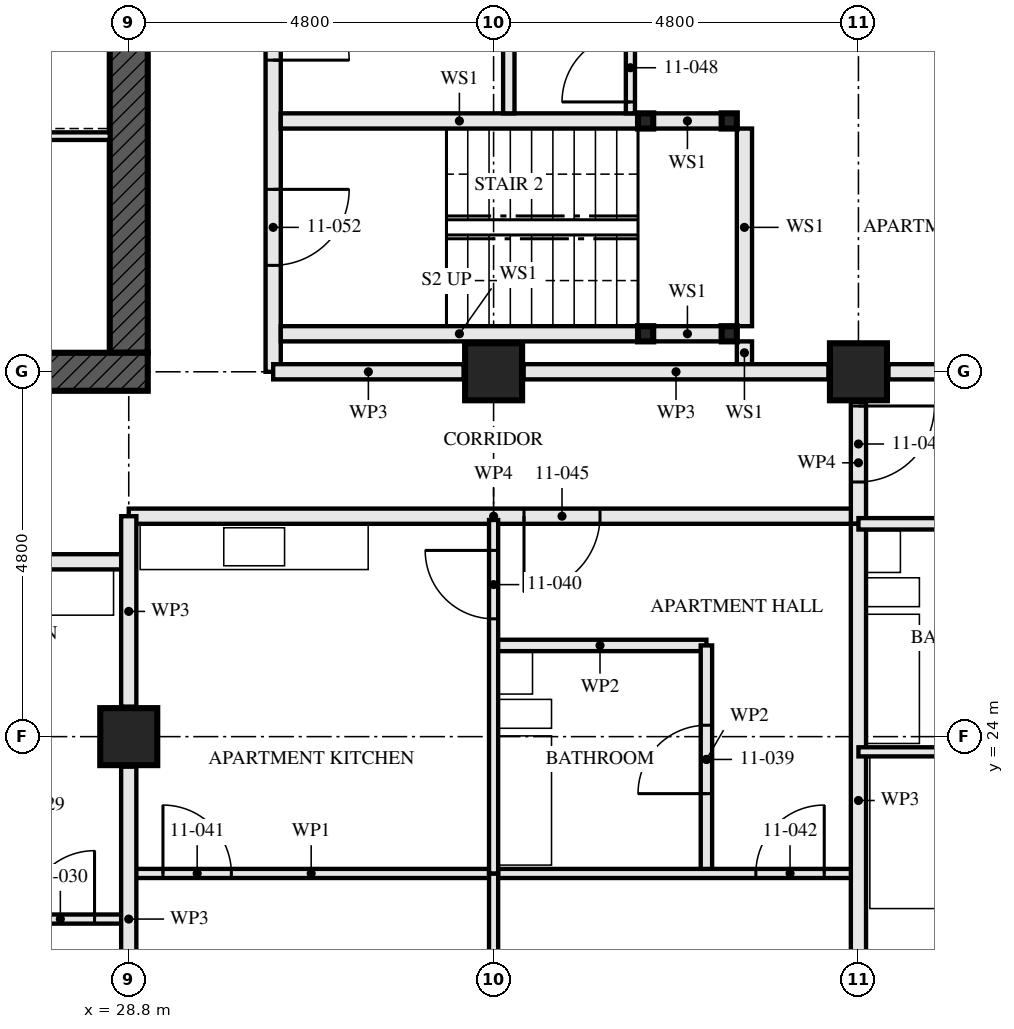
"""IFC4 building model, lengths in metres.
Left out: names, types, materials, properties, quantities, classifications, styles, units other than length and angle.
Written with IfcOpenShell. Run it as: python <this file> out.ifc"""

import sys

from ifc_helpers import new_model, si_unit, direction, frame, frame_2d, origin, origin_2d, place, context, subcontext, project, spatial, rectangle, hollow_rectangle, extrude, element, fill, save


model = new_model("IFC4")
c1 = context("Model", 3, precision=1e-05, world=origin(), true_north=direction((0.0, 1.0)))
c2 = subcontext(c1, "Body", "Model", "MODEL_VIEW")
j1 = project(units=[si_unit("LENGTHUNIT", "METRE"), si_unit("PLANEANGLEUNIT", "RADIAN")], contexts=[c1])
p1 = place(None, origin())
s1 = spatial("IfcSite", under=j1, at=p1, CompositionType="ELEMENT")
p2 = place(p1, origin())
s2 = spatial("IfcBuilding", under=s1, at=p2, CompositionType="ELEMENT")
p3 = place(p2, frame((0.0, 0.0, 44.5)))
s3 = spatial("IfcBuildingStorey", under=s2, at=p3, CompositionType="ELEMENT", Elevation=44.5)
for number, where, z_axis, x_axis in (
    (1, (28.8, 24.0, 0.0), (0.0, 0.0, 1.0), (1.0, 0.0, 0.0)),
    (2, (33.6, 28.8, 0.0), (0.0, 0.0, 1.0), (0.0, 1.0, 0.0)),
    (3, (38.4, 28.8, 0.0), (0.0, 0.0, 1.0), (0.0, 1.0, 0.0)),
):
    element("IfcColumn", number, at=place(p3, frame(where, z_axis=z_axis, x_axis=x_axis)), inside=s3, PredefinedType="COLUMN", context=c2, shape_type="SweptSolid", body=[
        extrude(hollow_rectangle(XDim=0.75, YDim=0.75, WallThickness=0.08, at=origin_2d()), origin(), (0.0, 0.0, 1.0), 3.5),
    ])
p4 = place(p3, frame((14.15, 28.8, -0.17), z_axis=(0.0, 0.0, 1.0), x_axis=(1.0, 0.0, 0.0)))
e4 = element("IfcWall", 4, at=p4, inside=s3, PredefinedType="SHEAR", context=c2, shape_type="SweptSolid", body=[
    extrude(rectangle(XDim=14.9, YDim=0.5, at=frame_2d((7.45, 0.0))), origin(), (0.0, 0.0, 1.0), 3.5),
])
p5 = place(p4, frame((6.85, 0.0, 0.17)))
e5 = element("IfcOpeningElement", 5, at=p5, cuts=e4, PredefinedType="OPENING", context=c2, shape_type="SweptSolid", body=[
    extrude(rectangle(XDim=1.2, YDim=2.1, at=frame_2d((0.6, 1.05))), frame((0.0, 0.26, 0.0), z_axis=(0.0, -1.0, 0.0), x_axis=(1.0, 0.0, 0.0)), (0.0, 0.0, 1.0), 0.521),
])
p6 = place(p3, frame((28.8, 29.05, -0.17), z_axis=(0.0, 0.0, 1.0), x_axis=(0.0, 1.0, 0.0)))
e6 = element("IfcWall", 6, at=p6, inside=s3, PredefinedType="SHEAR", context=c2, shape_type="SweptSolid", body=[
    extrude(rectangle(XDim=13.9, YDim=0.5, at=frame_2d((6.95, 0.0))), origin(), (0.0, 0.0, 1.0), 3.5),
])
p7 = place(p6, frame((6.35, 0.0, 0.17)))
e7 = element("IfcOpeningElement", 7, at=p7, cuts=e6, PredefinedType="OPENING", context=c2, shape_type="SweptSolid", body=[
    extrude(rectangle(XDim=1.2, YDim=2.1, at=frame_2d((0.6, 1.05))), frame((0.0, 0.26, 0.0), z_axis=(0.0, -1.0, 0.0), x_axis=(1.0, 0.0, 0.0)), (0.0, 0.0, 1.0), 0.521),
])
for number, where, z_axis, x_axis in (
    (8, (36.7, 29.3, 0.0), (0.0, 0.0, 1.0), (1.0, 0.0, 0.0)),
    (9, (36.7, 32.1, 0.0), (0.0, 0.0, 1.0), (1.0, 0.0, 0.0)),
    (10, (35.6, 29.3, 0.0), (0.0, 0.0, 1.0), (1.0, 0.0, 0.0)),
    (11, (35.6, 32.1, 0.0), (0.0, 0.0, 1.0), (1.0, 0.0, 0.0)),
):
    element("IfcColumn", number, at=place(p3, frame(where, z_axis=z_axis, x_axis=x_axis)), inside=s3, PredefinedType="COLUMN", context=c2, shape_type="SweptSolid", body=[
        extrude(hollow_rectangle(XDim=0.2, YDim=0.2, WallThickness=0.008, at=origin_2d()), origin(), (0.0, 0.0, 1.0), 3.33),
    ])
p8 = place(p3, frame((24.0, 21.6, 0.0), z_axis=(0.0, 0.0, 1.0), x_axis=(1.0, 0.0, 0.0)))
e12 = element("IfcWall", 12, at=p8, inside=s3, PredefinedType="PARTITIONING", context=c2, shape_type="SweptSolid", body=[
    extrude(rectangle(XDim=4.8, YDim=0.12, at=frame_2d((2.4, 0.0))), origin(), (0.0, 0.0, 1.0), 3.33),
])
p9 = place(p8, frame((3.45, 0.0, 0.0)))
e13 = element("IfcOpeningElement", 13, at=p9, cuts=e12, PredefinedType="OPENING", context=c2, shape_type="SweptSolid", body=[
    extrude(rectangle(XDim=0.9, YDim=2.1, at=frame_2d((0.45, 1.05))), frame((0.0, 0.071, 0.0), z_axis=(0.0, -1.0, 0.0), x_axis=(1.0, 0.0, 0.0)), (0.0, 0.0, 1.0), 0.141),
])
p10 = place(p3, frame((17.8, 26.3, 0.0), z_axis=(0.0, 0.0, 1.0), x_axis=(1.0, 0.0, 0.0)))
e14 = element("IfcWall", 14, at=p10, inside=s3, PredefinedType="PARTITIONING", context=c2, shape_type="SweptSolid", body=[
    extrude(rectangle(XDim=11.0, YDim=0.2, at=frame_2d((5.5, 0.0))), origin(), (0.0, 0.0, 1.0), 2.55),
])
p11 = place(p10, frame((1.8, 0.0, 0.0)))
e15 = element("IfcOpeningElement", 15, at=p11, cuts=e14, PredefinedType="OPENING", context=c2, shape_type="SweptSolid", body=[
    extrude(rectangle(XDim=1.0, YDim=2.1, at=frame_2d((0.5, 1.05))), frame((0.0, 0.111, 0.0), z_axis=(0.0, -1.0, 0.0), x_axis=(1.0, 0.0, 0.0)), (0.0, 0.0, 1.0), 0.221),
])
p12 = place(p10, frame((6.6, 0.0, 0.0)))
e16 = element("IfcOpeningElement", 16, at=p12, cuts=e14, PredefinedType="OPENING", context=c2, shape_type="SweptSolid", body=[
    extrude(rectangle(XDim=1.0, YDim=2.1, at=frame_2d((0.5, 1.05))), frame((0.0, 0.111, 0.0), z_axis=(0.0, -1.0, 0.0), x_axis=(1.0, 0.0, 0.0)), (0.0, 0.0, 1.0), 0.221),
])
p13 = place(p3, frame((36.4, 22.2, 0.0), z_axis=(0.0, 0.0, 1.0), x_axis=(0.0, 1.0, 0.0)))
e17 = element("IfcWall", 17, at=p13, inside=s3, PredefinedType="PARTITIONING", context=c2, shape_type="SweptSolid", body=[
    extrude(rectangle(XDim=3.0, YDim=0.15, at=frame_2d((1.5, 0.0))), origin(), (0.0, 0.0, 1.0), 2.55),
])
p14 = place(p13, frame((1.05, 0.0, 0.0)))
e18 = element("IfcOpeningElement", 18, at=p14, cuts=e17, PredefinedType="OPENING", context=c2, shape_type="SweptSolid", body=[
    extrude(rectangle(XDim=0.9, YDim=2.1, at=frame_2d((0.45, 1.05))), frame((0.0, 0.085, 0.0), z_axis=(0.0, -1.0, 0.0), x_axis=(1.0, 0.0, 0.0)), (0.0, 0.0, 1.0), 0.171),
])
p15 = place(p3, frame((33.6, 25.2, 0.0), z_axis=(0.0, 0.0, 1.0), x_axis=(1.0, 0.0, 0.0)))
e19 = element("IfcWall", 19, at=p15, inside=s3, PredefinedType="PARTITIONING", context=c2, shape_type="SweptSolid", body=[
    extrude(rectangle(XDim=2.8, YDim=0.15, at=frame_2d((1.4, 0.0))), origin(), (0.0, 0.0, 1.0), 3.33),
])
p16 = place(p3, frame((33.6, 22.2, 0.0), z_axis=(0.0, 0.0, 1.0), x_axis=(0.0, 1.0, 0.0)))
e20 = element("IfcWall", 20, at=p16, inside=s3, PredefinedType="PARTITIONING", context=c2, shape_type="SweptSolid", body=[
    extrude(rectangle(XDim=4.65, YDim=0.12, at=frame_2d((2.325, 0.0))), origin(), (0.0, 0.0, 1.0), 2.55),
])
p17 = place(p16, frame((3.35, 0.0, 0.0)))
e21 = element("IfcOpeningElement", 21, at=p17, cuts=e20, PredefinedType="OPENING", context=c2, shape_type="SweptSolid", body=[
    extrude(rectangle(XDim=0.9, YDim=2.1, at=frame_2d((0.45, 1.05))), frame((0.0, 0.071, 0.0), z_axis=(0.0, -1.0, 0.0), x_axis=(1.0, 0.0, 0.0)), (0.0, 0.0, 1.0), 0.141),
])
p18 = place(p3, frame((28.8, 22.2, 0.0), z_axis=(0.0, 0.0, 1.0), x_axis=(1.0, 0.0, 0.0)))
e22 = element("IfcWall", 22, at=p18, inside=s3, PredefinedType="PARTITIONING", context=c2, shape_type="SweptSolid", body=[
    extrude(rectangle(XDim=4.8, YDim=0.12, at=frame_2d((2.4, 0.0))), origin(), (0.0, 0.0, 1.0), 3.33),
])
p19 = place(p18, frame((0.45, 0.0, 0.0)))
e23 = element("IfcOpeningElement", 23, at=p19, cuts=e22, PredefinedType="OPENING", context=c2, shape_type="SweptSolid", body=[
    extrude(rectangle(XDim=0.9, YDim=2.1, at=frame_2d((0.45, 1.05))), frame((0.0, 0.071, 0.0), z_axis=(0.0, -1.0, 0.0), x_axis=(1.0, 0.0, 0.0)), (0.0, 0.0, 1.0), 0.141),
])
p20 = place(p3, frame((33.6, 22.2, 0.0), z_axis=(0.0, 0.0, 1.0), x_axis=(1.0, 0.0, 0.0)))
e24 = element("IfcWall", 24, at=p20, inside=s3, PredefinedType="PARTITIONING", context=c2, shape_type="SweptSolid", body=[
    extrude(rectangle(XDim=4.8, YDim=0.12, at=frame_2d((2.4, 0.0))), origin(), (0.0, 0.0, 1.0), 3.33),
])
p21 = place(p20, frame((3.45, 0.0, 0.0)))
e25 = element("IfcOpeningElement", 25, at=p21, cuts=e24, PredefinedType="OPENING", context=c2, shape_type="SweptSolid", body=[
    extrude(rectangle(XDim=0.9, YDim=2.1, at=frame_2d((0.45, 1.05))), frame((0.0, 0.071, 0.0), z_axis=(0.0, -1.0, 0.0), x_axis=(1.0, 0.0, 0.0)), (0.0, 0.0, 1.0), 0.141),
])
p22 = place(p3, frame((33.6, 14.72, 0.0), z_axis=(0.0, 0.0, 1.0), x_axis=(0.0, 1.0, 0.0)))
e26 = element("IfcWall", 26, at=p22, inside=s3, PredefinedType="PARTITIONING", context=c2, shape_type="SweptSolid", body=[
    extrude(rectangle(XDim=7.48, YDim=0.12, at=frame_2d((3.74, 0.0))), origin(), (0.0, 0.0, 1.0), 2.55),
])
p23 = place(p3, frame((38.4, 19.52, 0.0), z_axis=(0.0, 0.0, 1.0), x_axis=(0.0, 1.0, 0.0)))
e27 = element("IfcWall", 27, at=p23, inside=s3, PredefinedType="PARTITIONING", context=c2, shape_type="SweptSolid", body=[
    extrude(rectangle(XDim=7.28, YDim=0.2, at=frame_2d((3.64, 0.0))), origin(), (0.0, 0.0, 1.0), 2.55),
])
p24 = place(p3, frame((38.4, 26.8, 0.0), z_axis=(0.0, 0.0, 1.0), x_axis=(1.0, 0.0, 0.0)))
e28 = element("IfcWall", 28, at=p24, inside=s3, PredefinedType="PARTITIONING", context=c2, shape_type="SweptSolid", body=[
    extrude(rectangle(XDim=2.8, YDim=0.15, at=frame_2d((1.4, 0.0))), origin(), (0.0, 0.0, 1.0), 3.33),
])
p25 = place(p3, frame((38.4, 23.8, 0.0), z_axis=(0.0, 0.0, 1.0), x_axis=(1.0, 0.0, 0.0)))
e29 = element("IfcWall", 29, at=p25, inside=s3, PredefinedType="PARTITIONING", context=c2, shape_type="SweptSolid", body=[
    extrude(rectangle(XDim=4.48, YDim=0.12, at=frame_2d((2.24, 0.0))), origin(), (0.0, 0.0, 1.0), 3.33),
])
p26 = place(p25, frame((2.975, 0.0, 0.0)))
e30 = element("IfcOpeningElement", 30, at=p26, cuts=e29, PredefinedType="OPENING", context=c2, shape_type="SweptSolid", body=[
    extrude(rectangle(XDim=0.9, YDim=2.1, at=frame_2d((0.45, 1.05))), frame((0.0, 0.071, 0.0), z_axis=(0.0, -1.0, 0.0), x_axis=(1.0, 0.0, 0.0)), (0.0, 0.0, 1.0), 0.141),
])
p27 = place(p3, frame((28.8, 26.9, 0.0), z_axis=(0.0, 0.0, 1.0), x_axis=(1.0, 0.0, 0.0)))
e31 = element("IfcWall", 31, at=p27, inside=s3, PredefinedType="PARTITIONING", context=c2, shape_type="SweptSolid", body=[
    extrude(rectangle(XDim=9.6, YDim=0.2, at=frame_2d((4.8, 0.0))), origin(), (0.0, 0.0, 1.0), 3.33),
])
p28 = place(p27, frame((5.2, 0.0, 0.0)))
e32 = element("IfcOpeningElement", 32, at=p28, cuts=e31, PredefinedType="OPENING", context=c2, shape_type="SweptSolid", body=[
    extrude(rectangle(XDim=1.0, YDim=2.1, at=frame_2d((0.5, 1.05))), frame((0.0, 0.111, 0.0), z_axis=(0.0, -1.0, 0.0), x_axis=(1.0, 0.0, 0.0)), (0.0, 0.0, 1.0), 0.221),
])
p29 = place(p3, frame((38.4, 26.8, 0.0), z_axis=(0.0, 0.0, 1.0), x_axis=(0.0, 1.0, 0.0)))
e33 = element("IfcWall", 33, at=p29, inside=s3, PredefinedType="PARTITIONING", context=c2, shape_type="SweptSolid", body=[
    extrude(rectangle(XDim=1.605, YDim=0.2, at=frame_2d((0.802, 0.0))), origin(), (0.0, 0.0, 1.0), 3.33),
])
p30 = place(p29, frame((0.55, 0.0, 0.0)))
e34 = element("IfcOpeningElement", 34, at=p30, cuts=e33, PredefinedType="OPENING", context=c2, shape_type="SweptSolid", body=[
    extrude(rectangle(XDim=1.0, YDim=2.1, at=frame_2d((0.5, 1.05))), frame((0.0, 0.111, 0.0), z_axis=(0.0, -1.0, 0.0), x_axis=(1.0, 0.0, 0.0)), (0.0, 0.0, 1.0), 0.221),
])
p31 = place(p3, frame((36.6, 29.3, 0.0), z_axis=(0.0, 0.0, 1.0), x_axis=(-1.0, 0.0, 0.0)))
e35 = element("IfcWall", 35, at=p31, inside=s3, PredefinedType="SOLIDWALL", context=c2, shape_type="SweptSolid", body=[
    extrude(rectangle(XDim=0.9, YDim=0.2, at=frame_2d((0.45, 0.0))), origin(), (0.0, 0.0, 1.0), 2.99),
])
p32 = place(p3, frame((35.5, 29.3, 0.0), z_axis=(0.0, 0.0, 1.0), x_axis=(-1.0, 0.0, 0.0)))
e36 = element("IfcWall", 36, at=p32, inside=s3, PredefinedType="SOLIDWALL", context=c2, shape_type="SweptSolid", body=[
    extrude(rectangle(XDim=4.7, YDim=0.2, at=frame_2d((2.35, 0.0))), origin(), (0.0, 0.0, 1.0), 2.99),
])
p33 = place(p3, frame((36.6, 32.1, 0.0), z_axis=(0.0, 0.0, 1.0), x_axis=(-1.0, 0.0, 0.0)))
e37 = element("IfcWall", 37, at=p33, inside=s3, PredefinedType="SOLIDWALL", context=c2, shape_type="SweptSolid", body=[
    extrude(rectangle(XDim=0.9, YDim=0.2, at=frame_2d((0.45, 0.0))), origin(), (0.0, 0.0, 1.0), 2.99),
])
p34 = place(p3, frame((35.5, 32.1, 0.0), z_axis=(0.0, 0.0, 1.0), x_axis=(-1.0, 0.0, 0.0)))
e38 = element("IfcWall", 38, at=p34, inside=s3, PredefinedType="SOLIDWALL", context=c2, shape_type="SweptSolid", body=[
    extrude(rectangle(XDim=4.7, YDim=0.2, at=frame_2d((2.35, 0.0))), origin(), (0.0, 0.0, 1.0), 2.99),
])
p35 = place(p3, frame((36.9, 28.9, 0.0), z_axis=(0.0, 0.0, 1.0), x_axis=(0.0, 1.0, 0.0)))
e39 = element("IfcWall", 39, at=p35, inside=s3, PredefinedType="SOLIDWALL", context=c2, shape_type="SweptSolid", body=[
    extrude(rectangle(XDim=0.3, YDim=0.2, at=frame_2d((0.15, 0.0))), origin(), (0.0, 0.0, 1.0), 3.33),
])
p36 = place(p3, frame((36.9, 29.4, 0.0), z_axis=(0.0, 0.0, 1.0), x_axis=(0.0, 1.0, 0.0)))
e40 = element("IfcWall", 40, at=p36, inside=s3, PredefinedType="SOLIDWALL", context=c2, shape_type="SweptSolid", body=[
    extrude(rectangle(XDim=2.6, YDim=0.2, at=frame_2d((1.3, 0.0))), origin(), (0.0, 0.0, 1.0), 3.33),
])
p37 = place(p3, frame((33.8, 32.2, 0.0), z_axis=(0.0, 0.0, 1.0), x_axis=(0.0, 1.0, 0.0)))
e41 = element("IfcWall", 41, at=p37, inside=s3, PredefinedType="PARTITIONING", context=c2, shape_type="SweptSolid", body=[
    extrude(rectangle(XDim=2.4, YDim=0.15, at=frame_2d((1.2, 0.0))), origin(), (0.0, 0.0, 1.0), 2.55),
])
p38 = place(p3, frame((35.4, 32.2, 0.0), z_axis=(0.0, 0.0, 1.0), x_axis=(0.0, 1.0, 0.0)))
e42 = element("IfcWall", 42, at=p38, inside=s3, PredefinedType="PARTITIONING", context=c2, shape_type="SweptSolid", body=[
    extrude(rectangle(XDim=1.4, YDim=0.12, at=frame_2d((0.7, 0.0))), origin(), (0.0, 0.0, 1.0), 3.33),
])
p39 = place(p38, frame((0.15, 0.0, 0.0)))
e43 = element("IfcOpeningElement", 43, at=p39, cuts=e42, PredefinedType="OPENING", context=c2, shape_type="SweptSolid", body=[
    extrude(rectangle(XDim=0.9, YDim=2.1, at=frame_2d((0.45, 1.05))), frame((0.0, 0.071, 0.0), z_axis=(0.0, -1.0, 0.0), x_axis=(1.0, 0.0, 0.0)), (0.0, 0.0, 1.0), 0.141),
])
p40 = place(p3, frame((30.7, 28.8, 0.0), z_axis=(0.0, 0.0, 1.0), x_axis=(0.0, 1.0, 0.0)))
e44 = element("IfcWall", 44, at=p40, inside=s3, PredefinedType="PARTITIONING", context=c2, shape_type="SweptSolid", body=[
    extrude(rectangle(XDim=14.4, YDim=0.2, at=frame_2d((7.2, 0.0))), origin(), (0.0, 0.0, 1.0), 2.55),
])
p41 = place(p40, frame((1.4, 0.0, 0.0)))
e45 = element("IfcOpeningElement", 45, at=p41, cuts=e44, PredefinedType="OPENING", context=c2, shape_type="SweptSolid", body=[
    extrude(rectangle(XDim=1.0, YDim=2.1, at=frame_2d((0.5, 1.05))), frame((0.0, 0.111, 0.0), z_axis=(0.0, -1.0, 0.0), x_axis=(1.0, 0.0, 0.0)), (0.0, 0.0, 1.0), 0.221),
])
p42 = place(p40, frame((4.1, 0.0, 0.0)))
e46 = element("IfcOpeningElement", 46, at=p42, cuts=e44, PredefinedType="OPENING", context=c2, shape_type="SweptSolid", body=[
    extrude(rectangle(XDim=1.0, YDim=2.1, at=frame_2d((0.5, 1.05))), frame((0.0, 0.111, 0.0), z_axis=(0.0, -1.0, 0.0), x_axis=(1.0, 0.0, 0.0)), (0.0, 0.0, 1.0), 0.221),
])
p43 = place(p40, frame((5.975, 0.0, 0.0)))
e47 = element("IfcOpeningElement", 47, at=p43, cuts=e44, PredefinedType="OPENING", context=c2, shape_type="SweptSolid", body=[
    extrude(rectangle(XDim=1.0, YDim=2.1, at=frame_2d((0.5, 1.05))), frame((0.0, 0.111, 0.0), z_axis=(0.0, -1.0, 0.0), x_axis=(1.0, 0.0, 0.0)), (0.0, 0.0, 1.0), 0.221),
])
p44 = place(p40, frame((10.0, 0.0, 0.0)))
e48 = element("IfcOpeningElement", 48, at=p44, cuts=e44, PredefinedType="OPENING", context=c2, shape_type="SweptSolid", body=[
    extrude(rectangle(XDim=1.0, YDim=2.1, at=frame_2d((0.5, 1.05))), frame((0.0, 0.111, 0.0), z_axis=(0.0, -1.0, 0.0), x_axis=(1.0, 0.0, 0.0)), (0.0, 0.0, 1.0), 0.221),
])
p45 = place(p3, frame((23.15, 31.9, 0.0), z_axis=(0.0, 0.0, 1.0), x_axis=(1.0, 0.0, 0.0)))
e49 = element("IfcWall", 49, at=p45, inside=s3, PredefinedType="SOLIDWALL", context=c2, shape_type="SweptSolid", body=[
    extrude(rectangle(XDim=5.4, YDim=0.1, at=frame_2d((2.7, 0.0))), origin(), (0.0, 0.0, 1.0), 3.33),
])
p46 = place(p3, frame((28.8, 19.595, 0.0), z_axis=(0.0, 0.0, 1.0), x_axis=(0.0, 1.0, 0.0)))
e50 = element("IfcWall", 50, at=p46, inside=s3, PredefinedType="PARTITIONING", context=c2, shape_type="SweptSolid", body=[
    extrude(rectangle(XDim=4.01, YDim=0.2, at=frame_2d((2.005, 0.0))), origin(), (0.0, 0.0, 1.0), 2.32),
])
p47 = place(p3, frame((28.8, 24.395, 0.0), z_axis=(0.0, 0.0, 1.0), x_axis=(0.0, 1.0, 0.0)))
e51 = element("IfcWall", 51, at=p47, inside=s3, PredefinedType="PARTITIONING", context=c2, shape_type="SweptSolid", body=[
    extrude(rectangle(XDim=2.505, YDim=0.2, at=frame_2d((1.252, 0.0))), origin(), (0.0, 0.0, 1.0), 2.32),
])
p48 = place(p3, frame((42.88, 28.8, 0.0), z_axis=(0.0, 0.0, 1.0), x_axis=(-1.0, 0.0, 0.0)))
e52 = element("IfcWall", 52, at=p48, inside=s3, PredefinedType="PARTITIONING", context=c2, shape_type="SweptSolid", body=[
    extrude(rectangle(XDim=4.085, YDim=0.2, at=frame_2d((2.042, 0.0))), origin(), (0.0, 0.0, 1.0), 2.32),
])
p49 = place(p3, frame((38.005, 28.8, 0.0), z_axis=(0.0, 0.0, 1.0), x_axis=(-1.0, 0.0, 0.0)))
e53 = element("IfcWall", 53, at=p49, inside=s3, PredefinedType="PARTITIONING", context=c2, shape_type="SweptSolid", body=[
    extrude(rectangle(XDim=4.01, YDim=0.2, at=frame_2d((2.005, 0.0))), origin(), (0.0, 0.0, 1.0), 2.32),
])
p50 = place(p3, frame((33.205, 28.8, 0.0), z_axis=(0.0, 0.0, 1.0), x_axis=(-1.0, 0.0, 0.0)))
e54 = element("IfcWall", 54, at=p50, inside=s3, PredefinedType="PARTITIONING", context=c2, shape_type="SweptSolid", body=[
    extrude(rectangle(XDim=2.505, YDim=0.2, at=frame_2d((1.252, 0.0))), origin(), (0.0, 0.0, 1.0), 2.32),
])
p51 = place(p9, origin())
e55 = element("IfcDoor", 55, at=p51, inside=s3, OperationType="SINGLE_SWING_LEFT", PredefinedType="DOOR", context=c2, shape_type="SweptSolid", body=[
    extrude(rectangle(XDim=0.9, YDim=2.1, at=frame_2d((0.45, 1.05))), frame((0.0, 0.022, 0.0), z_axis=(0.0, -1.0, 0.0), x_axis=(1.0, 0.0, 0.0)), (0.0, 0.0, 1.0), 0.044),
])
fill(e13, e55)
p52 = place(p14, origin())
e56 = element("IfcDoor", 56, at=p52, inside=s3, OperationType="SINGLE_SWING_RIGHT", PredefinedType="DOOR", context=c2, shape_type="SweptSolid", body=[
    extrude(rectangle(XDim=0.9, YDim=2.1, at=frame_2d((0.45, 1.05))), frame((0.0, 0.022, 0.0), z_axis=(0.0, -1.0, 0.0), x_axis=(1.0, 0.0, 0.0)), (0.0, 0.0, 1.0), 0.044),
])
fill(e18, e56)
p53 = place(p17, origin())
e57 = element("IfcDoor", 57, at=p53, inside=s3, OperationType="SINGLE_SWING_LEFT", PredefinedType="DOOR", context=c2, shape_type="SweptSolid", body=[
    extrude(rectangle(XDim=0.9, YDim=2.1, at=frame_2d((0.45, 1.05))), frame((0.0, 0.022, 0.0), z_axis=(0.0, -1.0, 0.0), x_axis=(1.0, 0.0, 0.0)), (0.0, 0.0, 1.0), 0.044),
])
fill(e21, e57)
p54 = place(p19, origin())
e58 = element("IfcDoor", 58, at=p54, inside=s3, OperationType="SINGLE_SWING_RIGHT", PredefinedType="DOOR", context=c2, shape_type="SweptSolid", body=[
    extrude(rectangle(XDim=0.9, YDim=2.1, at=frame_2d((0.45, 1.05))), frame((0.0, 0.022, 0.0), z_axis=(0.0, -1.0, 0.0), x_axis=(1.0, 0.0, 0.0)), (0.0, 0.0, 1.0), 0.044),
])
fill(e23, e58)
p55 = place(p21, origin())
e59 = element("IfcDoor", 59, at=p55, inside=s3, OperationType="SINGLE_SWING_LEFT", PredefinedType="DOOR", context=c2, shape_type="SweptSolid", body=[
    extrude(rectangle(XDim=0.9, YDim=2.1, at=frame_2d((0.45, 1.05))), frame((0.0, 0.022, 0.0), z_axis=(0.0, -1.0, 0.0), x_axis=(1.0, 0.0, 0.0)), (0.0, 0.0, 1.0), 0.044),
])
fill(e25, e59)
p56 = place(p28, frame((1.0, 0.0, 0.0), z_axis=(0.0, 0.0, 1.0), x_axis=(-1.0, 0.0, 0.0)))
e60 = element("IfcDoor", 60, at=p56, inside=s3, OperationType="SINGLE_SWING_LEFT", PredefinedType="DOOR", context=c2, shape_type="SweptSolid", body=[
    extrude(rectangle(XDim=1.0, YDim=2.1, at=frame_2d((0.5, 1.05))), frame((0.0, 0.027, 0.0), z_axis=(0.0, -1.0, 0.0), x_axis=(1.0, 0.0, 0.0)), (0.0, 0.0, 1.0), 0.054),
])
fill(e32, e60)
p57 = place(p30, frame((1.0, 0.0, 0.0), z_axis=(0.0, 0.0, 1.0), x_axis=(-1.0, 0.0, 0.0)))
e61 = element("IfcDoor", 61, at=p57, inside=s3, OperationType="SINGLE_SWING_RIGHT", PredefinedType="DOOR", context=c2, shape_type="SweptSolid", body=[
    extrude(rectangle(XDim=1.0, YDim=2.1, at=frame_2d((0.5, 1.05))), frame((0.0, 0.027, 0.0), z_axis=(0.0, -1.0, 0.0), x_axis=(1.0, 0.0, 0.0)), (0.0, 0.0, 1.0), 0.054),
])
fill(e34, e61)
p58 = place(p39, origin())
e62 = element("IfcDoor", 62, at=p58, inside=s3, OperationType="SINGLE_SWING_RIGHT", PredefinedType="DOOR", context=c2, shape_type="SweptSolid", body=[
    extrude(rectangle(XDim=0.9, YDim=2.1, at=frame_2d((0.45, 1.05))), frame((0.0, 0.022, 0.0), z_axis=(0.0, -1.0, 0.0), x_axis=(1.0, 0.0, 0.0)), (0.0, 0.0, 1.0), 0.044),
])
fill(e43, e62)
p59 = place(p41, frame((1.0, 0.0, 0.0), z_axis=(0.0, 0.0, 1.0), x_axis=(-1.0, 0.0, 0.0)))
e63 = element("IfcDoor", 63, at=p59, inside=s3, OperationType="SINGLE_SWING_RIGHT", PredefinedType="DOOR", context=c2, shape_type="SweptSolid", body=[
    extrude(rectangle(XDim=1.0, YDim=2.1, at=frame_2d((0.5, 1.05))), frame((0.0, 0.032, 0.0), z_axis=(0.0, -1.0, 0.0), x_axis=(1.0, 0.0, 0.0)), (0.0, 0.0, 1.0), 0.064),
])
fill(e45, e63)
p60 = place(p42, frame((1.0, 0.0, 0.0), z_axis=(0.0, 0.0, 1.0), x_axis=(-1.0, 0.0, 0.0)))
e64 = element("IfcDoor", 64, at=p60, inside=s3, OperationType="SINGLE_SWING_LEFT", PredefinedType="DOOR", context=c2, shape_type="SweptSolid", body=[
    extrude(rectangle(XDim=1.0, YDim=2.1, at=frame_2d((0.5, 1.05))), frame((0.0, 0.027, 0.0), z_axis=(0.0, -1.0, 0.0), x_axis=(1.0, 0.0, 0.0)), (0.0, 0.0, 1.0), 0.054),
])
fill(e46, e64)
save(model, sys.argv[1])
